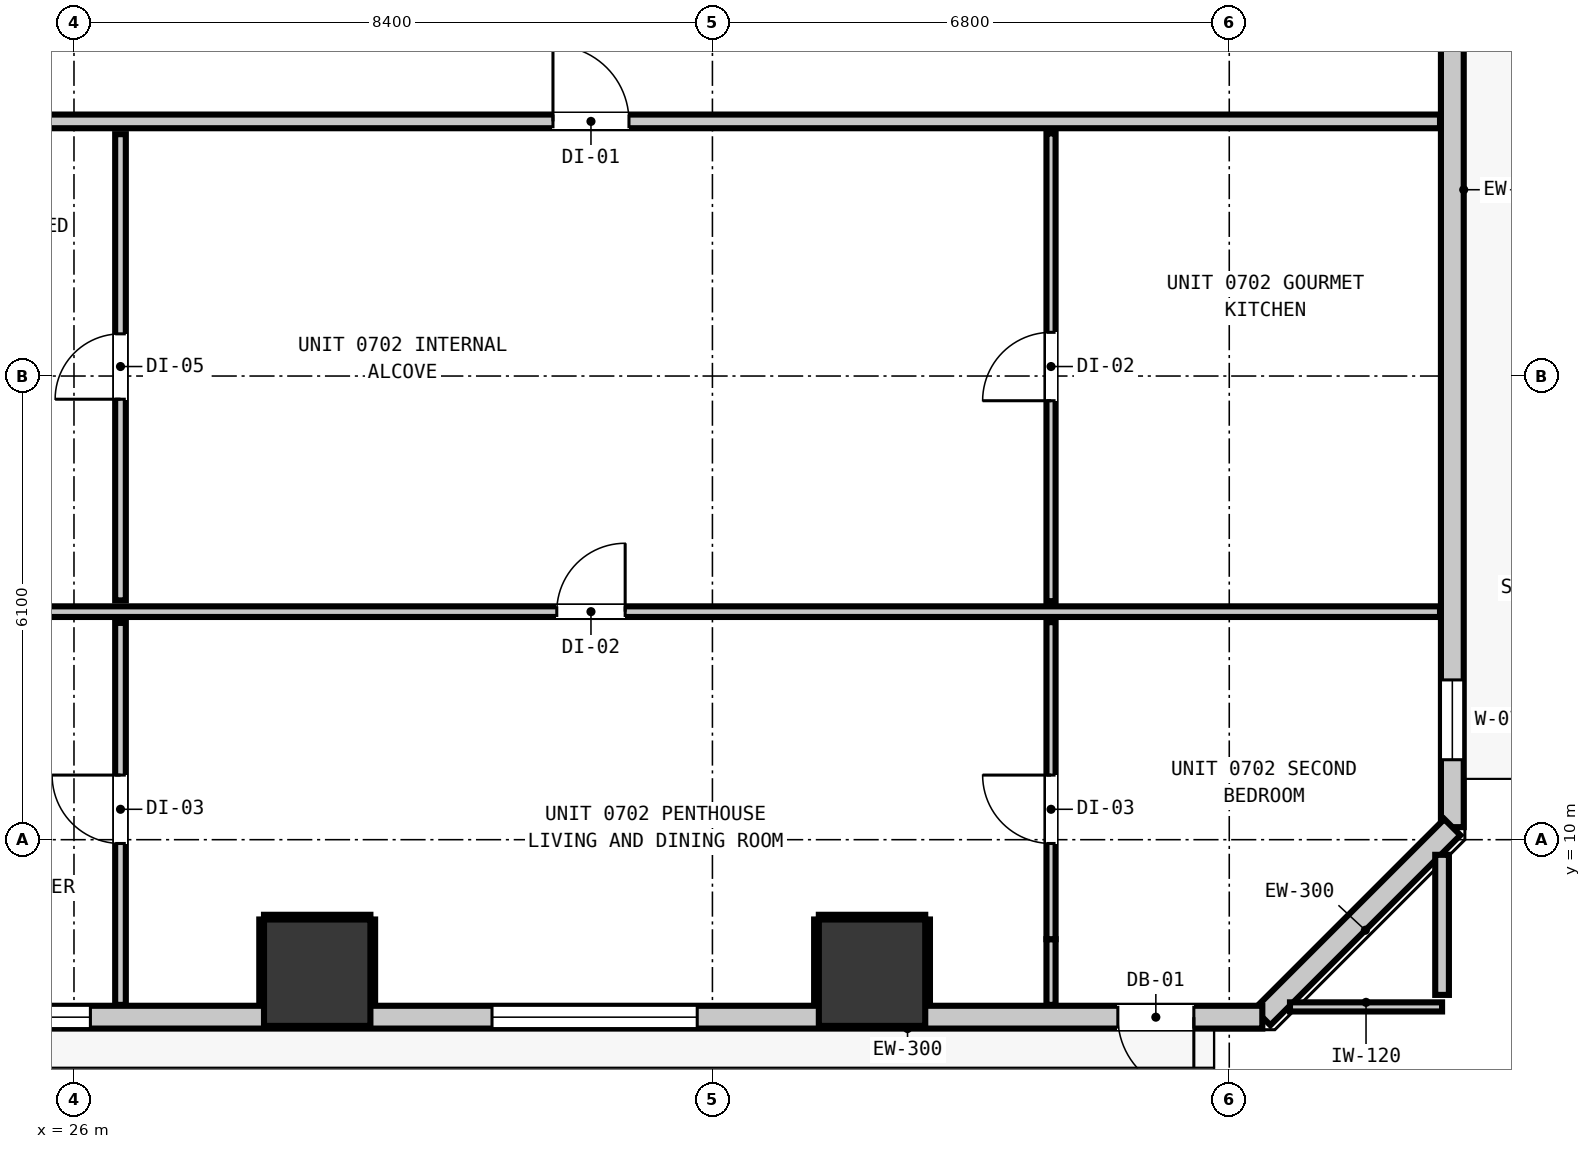
"""IFC4 building model, lengths in metres.
Left out: names, types, materials, properties, quantities, classifications, styles, units other than length and angle.
Written with IfcOpenShell. Run it as: python <this file> out.ifc"""

import sys

from ifc_helpers import new_model, si_unit, direction, frame, frame_2d, origin, origin_2d, place, context, subcontext, project, spatial, rectangle, extrude, element, fill, save


model = new_model("IFC4")
c1 = context("Model", 3, precision=1e-05, world=origin(), true_north=direction((0.0, 1.0)))
c2 = subcontext(c1, "Body", "Model", "MODEL_VIEW")
j1 = project(units=[si_unit("LENGTHUNIT", "METRE"), si_unit("PLANEANGLEUNIT", "RADIAN")], contexts=[c1])
p1 = place(None, origin())
s1 = spatial("IfcSite", under=j1, at=p1, CompositionType="ELEMENT")
p2 = place(p1, origin())
s2 = spatial("IfcBuilding", under=s1, at=p2, CompositionType="ELEMENT")
p3 = place(p2, frame((0.0, 0.0, 28.64)))
s3 = spatial("IfcBuildingStorey", under=s2, at=p3, CompositionType="ELEMENT", Elevation=28.64)
for number, where, z_axis, x_axis in (
    (1, (29.2, 8.25, 0.0), (0.0, 0.0, 1.0), (1.0, 0.0, 0.0)),
    (2, (36.5, 8.25, 0.0), (0.0, 0.0, 1.0), (1.0, 0.0, 0.0)),
):
    element("IfcColumn", number, at=place(p3, frame(where, z_axis=z_axis, x_axis=x_axis)), inside=s3, PredefinedType="COLUMN", context=c2, shape_type="SweptSolid", body=[
        extrude(rectangle(XDim=1.4, YDim=1.4, at=origin_2d()), origin(), (0.0, 0.0, 1.0), 3.32),
    ])
p4 = place(p3, frame((44.135, 44.835, 0.0), z_axis=(0.0, 0.0, 1.0), x_axis=(0.0, -1.0, 0.0)))
e3 = element("IfcWall", 3, at=p4, inside=s3, PredefinedType="STANDARD", context=c2, shape_type="SweptSolid", body=[
    extrude(rectangle(XDim=34.67, YDim=0.3, at=frame_2d((17.335, 0.0))), origin(), (0.0, 0.0, 1.0), 3.06),
])
p5 = place(p4, frame((1.251, 0.0, 0.0)))
e4 = element("IfcOpeningElement", 4, at=p5, cuts=e3, PredefinedType="OPENING", context=c2, shape_type="SweptSolid", body=[
    extrude(rectangle(XDim=1.0, YDim=2.15, at=frame_2d((0.5, 1.075))), frame((0.0, 0.16, 0.0), z_axis=(0.0, -1.0, 0.0), x_axis=(1.0, 0.0, 0.0)), (0.0, 0.0, 1.0), 0.32),
])
p6 = place(p4, frame((32.733, 0.0, 0.85)))
e5 = element("IfcOpeningElement", 5, at=p6, cuts=e3, PredefinedType="OPENING", context=c2, shape_type="SweptSolid", body=[
    extrude(rectangle(XDim=1.05, YDim=1.65, at=frame_2d((0.525, 0.825))), frame((0.0, 0.16, 0.0), z_axis=(0.0, -1.0, 0.0), x_axis=(1.0, 0.0, 0.0)), (0.0, 0.0, 1.0), 0.32),
])
p7 = place(p4, frame((17.135, 0.0, 0.85)))
e6 = element("IfcOpeningElement", 6, at=p7, cuts=e3, PredefinedType="OPENING", context=c2, shape_type="SweptSolid", body=[
    extrude(rectangle(XDim=2.7, YDim=2.0, at=frame_2d((1.35, 1.0))), frame((0.0, 0.16, 0.0), z_axis=(0.0, -1.0, 0.0), x_axis=(1.0, 0.0, 0.0)), (0.0, 0.0, 1.0), 0.32),
])
p8 = place(p4, frame((6.984, 0.0, 0.85)))
e7 = element("IfcOpeningElement", 7, at=p8, cuts=e3, PredefinedType="OPENING", context=c2, shape_type="SweptSolid", body=[
    extrude(rectangle(XDim=1.05, YDim=1.65, at=frame_2d((0.525, 0.825))), frame((0.0, 0.16, 0.0), z_axis=(0.0, -1.0, 0.0), x_axis=(1.0, 0.0, 0.0)), (0.0, 0.0, 1.0), 0.32),
])
p9 = place(p3, frame((44.135, 10.165, 0.0), z_axis=(0.0, 0.0, 1.0), x_axis=(-0.707106781187, -0.707106781187, 0.0)))
e8 = element("IfcWall", 8, at=p9, inside=s3, PredefinedType="STANDARD", context=c2, shape_type="SweptSolid", body=[
    extrude(rectangle(XDim=3.536, YDim=0.3, at=frame_2d((1.768, 0.0))), origin(), (0.0, 0.0, 1.0), 3.06),
])
p10 = place(p3, frame((41.635, 7.665, 0.0), z_axis=(0.0, 0.0, 1.0), x_axis=(-1.0, 0.0, 0.0)))
e9 = element("IfcWall", 9, at=p10, inside=s3, PredefinedType="STANDARD", context=c2, shape_type="SweptSolid", body=[
    extrude(rectangle(XDim=37.47, YDim=0.3, at=frame_2d((18.735, 0.0))), origin(), (0.0, 0.0, 1.0), 3.06),
])
p11 = place(p10, frame((0.901, 0.0, 0.0)))
e10 = element("IfcOpeningElement", 10, at=p11, cuts=e9, PredefinedType="OPENING", context=c2, shape_type="SweptSolid", body=[
    extrude(rectangle(XDim=1.0, YDim=2.15, at=frame_2d((0.5, 1.075))), frame((0.0, 0.16, 0.0), z_axis=(0.0, -1.0, 0.0), x_axis=(1.0, 0.0, 0.0)), (0.0, 0.0, 1.0), 0.32),
])
p12 = place(p10, frame((31.795, 0.0, 0.85)))
e11 = element("IfcOpeningElement", 11, at=p12, cuts=e9, PredefinedType="OPENING", context=c2, shape_type="SweptSolid", body=[
    extrude(rectangle(XDim=2.7, YDim=2.0, at=frame_2d((1.35, 1.0))), frame((0.0, 0.16, 0.0), z_axis=(0.0, -1.0, 0.0), x_axis=(1.0, 0.0, 0.0)), (0.0, 0.0, 1.0), 0.32),
])
p13 = place(p10, frame((36.621, 0.0, 0.85)))
e12 = element("IfcOpeningElement", 12, at=p13, cuts=e9, PredefinedType="OPENING", context=c2, shape_type="SweptSolid", body=[
    extrude(rectangle(XDim=0.58, YDim=1.5, at=frame_2d((0.29, 0.75))), frame((0.0, 0.16, 0.0), z_axis=(0.0, -1.0, 0.0), x_axis=(1.0, 0.0, 0.0)), (0.0, 0.0, 1.0), 0.32),
])
p14 = place(p10, frame((24.495, 0.0, 0.85)))
e13 = element("IfcOpeningElement", 13, at=p14, cuts=e9, PredefinedType="OPENING", context=c2, shape_type="SweptSolid", body=[
    extrude(rectangle(XDim=2.7, YDim=2.0, at=frame_2d((1.35, 1.0))), frame((0.0, 0.16, 0.0), z_axis=(0.0, -1.0, 0.0), x_axis=(1.0, 0.0, 0.0)), (0.0, 0.0, 1.0), 0.32),
])
p15 = place(p10, frame((22.221, 0.0, 0.85)))
e14 = element("IfcOpeningElement", 14, at=p15, cuts=e9, PredefinedType="OPENING", context=c2, shape_type="SweptSolid", body=[
    extrude(rectangle(XDim=1.05, YDim=1.65, at=frame_2d((0.525, 0.825))), frame((0.0, 0.16, 0.0), z_axis=(0.0, -1.0, 0.0), x_axis=(1.0, 0.0, 0.0)), (0.0, 0.0, 1.0), 0.32),
])
p16 = place(p10, frame((7.435, 0.0, 0.85)))
e15 = element("IfcOpeningElement", 15, at=p16, cuts=e9, PredefinedType="OPENING", context=c2, shape_type="SweptSolid", body=[
    extrude(rectangle(XDim=2.7, YDim=2.0, at=frame_2d((1.35, 1.0))), frame((0.0, 0.16, 0.0), z_axis=(0.0, -1.0, 0.0), x_axis=(1.0, 0.0, 0.0)), (0.0, 0.0, 1.0), 0.32),
])
p17 = place(p10, frame((15.419, 0.0, 0.85)))
e16 = element("IfcOpeningElement", 16, at=p17, cuts=e9, PredefinedType="OPENING", context=c2, shape_type="SweptSolid", body=[
    extrude(rectangle(XDim=2.7, YDim=2.0, at=frame_2d((1.35, 1.0))), frame((0.0, 0.16, 0.0), z_axis=(0.0, -1.0, 0.0), x_axis=(1.0, 0.0, 0.0)), (0.0, 0.0, 1.0), 0.32),
])
p18 = place(p3, frame((1.827, 19.45, 0.0), z_axis=(0.0, 0.0, 1.0), x_axis=(1.0, 0.0, 0.0)))
e17 = element("IfcWall", 17, at=p18, inside=s3, PredefinedType="PARTITIONING", context=c2, shape_type="SweptSolid", body=[
    extrude(rectangle(XDim=42.146, YDim=0.18, at=frame_2d((21.073, 0.0))), origin(), (0.0, 0.0, 1.0), 3.06),
])
p19 = place(p18, frame((8.602, 0.0, 0.0)))
e18 = element("IfcOpeningElement", 18, at=p19, cuts=e17, PredefinedType="OPENING", context=c2, shape_type="SweptSolid", body=[
    extrude(rectangle(XDim=1.0, YDim=2.15, at=frame_2d((0.5, 1.075))), frame((0.0, 0.1, 0.0), z_axis=(0.0, -1.0, 0.0), x_axis=(1.0, 0.0, 0.0)), (0.0, 0.0, 1.0), 0.2),
])
p20 = place(p18, frame((30.475, 0.0, 0.0)))
e19 = element("IfcOpeningElement", 19, at=p20, cuts=e17, PredefinedType="OPENING", context=c2, shape_type="SweptSolid", body=[
    extrude(rectangle(XDim=1.0, YDim=2.15, at=frame_2d((0.5, 1.075))), frame((0.0, 0.1, 0.0), z_axis=(0.0, -1.0, 0.0), x_axis=(1.0, 0.0, 0.0)), (0.0, 0.0, 1.0), 0.2),
])
p21 = place(p3, frame((11.688, 13.0, 0.0), z_axis=(0.0, 0.0, 1.0), x_axis=(1.0, 0.0, 0.0)))
e20 = element("IfcWall", 20, at=p21, inside=s3, PredefinedType="PARTITIONING", context=c2, shape_type="SweptSolid", body=[
    extrude(rectangle(XDim=32.285, YDim=0.14, at=frame_2d((16.143, 0.0))), origin(), (0.0, 0.0, 1.0), 3.06),
])
p22 = place(p21, frame((20.664, 0.0, 0.0)))
e21 = element("IfcOpeningElement", 21, at=p22, cuts=e20, PredefinedType="OPENING", context=c2, shape_type="SweptSolid", body=[
    extrude(rectangle(XDim=0.9, YDim=2.1, at=frame_2d((0.45, 1.05))), frame((0.0, 0.08, 0.0), z_axis=(0.0, -1.0, 0.0), x_axis=(1.0, 0.0, 0.0)), (0.0, 0.0, 1.0), 0.16),
])
p23 = place(p3, frame((41.999, 7.8, 0.0), z_axis=(0.0, 0.0, 1.0), x_axis=(1.0, 0.0, 0.0)))
e22 = element("IfcWall", 22, at=p23, inside=s3, PredefinedType="PARTITIONING", context=c2, shape_type="SweptSolid", body=[
    extrude(rectangle(XDim=2.001, YDim=0.12, at=frame_2d((1.0, 0.0))), origin(), (0.0, 0.0, 1.0), 3.06),
])
p24 = place(p3, frame((44.0, 7.958, 0.0), z_axis=(0.0, 0.0, 1.0), x_axis=(0.0, 1.0, 0.0)))
e23 = element("IfcWall", 23, at=p24, inside=s3, PredefinedType="PARTITIONING", context=c2, shape_type="SweptSolid", body=[
    extrude(rectangle(XDim=1.843, YDim=0.18, at=frame_2d((0.921, 0.0))), origin(), (0.0, 0.0, 1.0), 3.06),
])
p25 = place(p3, frame((26.612, 7.827, 0.0), z_axis=(0.0, 0.0, 1.0), x_axis=(0.0, 1.0, 0.0)))
e24 = element("IfcWall", 24, at=p25, inside=s3, PredefinedType="PARTITIONING", context=c2, shape_type="SweptSolid", body=[
    extrude(rectangle(XDim=5.025, YDim=0.14, at=frame_2d((2.513, 0.0))), origin(), (0.0, 0.0, 1.0), 3.06),
])
p26 = place(p25, frame((2.123, 0.0, 0.0)))
e25 = element("IfcOpeningElement", 25, at=p26, cuts=e24, PredefinedType="OPENING", context=c2, shape_type="SweptSolid", body=[
    extrude(rectangle(XDim=0.9, YDim=2.1, at=frame_2d((0.45, 1.05))), frame((0.0, 0.08, 0.0), z_axis=(0.0, -1.0, 0.0), x_axis=(1.0, 0.0, 0.0)), (0.0, 0.0, 1.0), 0.16),
])
p27 = place(p3, frame((26.612, 13.148, 0.0), z_axis=(0.0, 0.0, 1.0), x_axis=(0.0, 1.0, 0.0)))
e26 = element("IfcWall", 26, at=p27, inside=s3, PredefinedType="PARTITIONING", context=c2, shape_type="SweptSolid", body=[
    extrude(rectangle(XDim=6.134, YDim=0.14, at=frame_2d((3.067, 0.0))), origin(), (0.0, 0.0, 1.0), 3.06),
])
p28 = place(p27, frame((2.647, 0.0, 0.0)))
e27 = element("IfcOpeningElement", 27, at=p28, cuts=e26, PredefinedType="OPENING", context=c2, shape_type="SweptSolid", body=[
    extrude(rectangle(XDim=0.86, YDim=2.02, at=frame_2d((0.43, 1.01))), frame((0.0, 0.08, 0.0), z_axis=(0.0, -1.0, 0.0), x_axis=(1.0, 0.0, 0.0)), (0.0, 0.0, 1.0), 0.16),
])
p29 = place(p3, frame((38.855, 7.827, 0.0), z_axis=(0.0, 0.0, 1.0), x_axis=(0.0, 1.0, 0.0)))
e28 = element("IfcWall", 28, at=p29, inside=s3, PredefinedType="PARTITIONING", context=c2, shape_type="SweptSolid", body=[
    extrude(rectangle(XDim=0.864, YDim=0.12, at=frame_2d((0.432, 0.0))), origin(), (0.0, 0.0, 1.0), 3.06),
])
p30 = place(p3, frame((38.855, 8.691, 0.0), z_axis=(0.0, 0.0, 1.0), x_axis=(0.0, 1.0, 0.0)))
e29 = element("IfcWall", 29, at=p30, inside=s3, PredefinedType="PARTITIONING", context=c2, shape_type="SweptSolid", body=[
    extrude(rectangle(XDim=4.171, YDim=0.12, at=frame_2d((2.085, 0.0))), origin(), (0.0, 0.0, 1.0), 2.445),
])
p31 = place(p30, frame((1.259, 0.0, 0.0)))
e30 = element("IfcOpeningElement", 30, at=p31, cuts=e29, PredefinedType="OPENING", context=c2, shape_type="SweptSolid", body=[
    extrude(rectangle(XDim=0.9, YDim=2.1, at=frame_2d((0.45, 1.05))), frame((0.0, 0.07, 0.0), z_axis=(0.0, -1.0, 0.0), x_axis=(1.0, 0.0, 0.0)), (0.0, 0.0, 1.0), 0.14),
])
p32 = place(p3, frame((38.855, 13.138, 0.0), z_axis=(0.0, 0.0, 1.0), x_axis=(0.0, 1.0, 0.0)))
e31 = element("IfcWall", 31, at=p32, inside=s3, PredefinedType="PARTITIONING", context=c2, shape_type="SweptSolid", body=[
    extrude(rectangle(XDim=6.154, YDim=0.12, at=frame_2d((3.077, 0.0))), origin(), (0.0, 0.0, 1.0), 2.445),
])
p33 = place(p32, frame((2.637, 0.0, 0.0)))
e32 = element("IfcOpeningElement", 32, at=p33, cuts=e31, PredefinedType="OPENING", context=c2, shape_type="SweptSolid", body=[
    extrude(rectangle(XDim=0.9, YDim=2.1, at=frame_2d((0.45, 1.05))), frame((0.0, 0.07, 0.0), z_axis=(0.0, -1.0, 0.0), x_axis=(1.0, 0.0, 0.0)), (0.0, 0.0, 1.0), 0.14),
])
p34 = place(p3, frame((28.5, 8.982, 0.0), z_axis=(0.0, 0.0, 1.0), x_axis=(1.0, 0.0, 0.0)))
e33 = element("IfcWall", 33, at=p34, inside=s3, PredefinedType="PARTITIONING", context=c2, shape_type="SweptSolid", body=[
    extrude(rectangle(XDim=1.4, YDim=0.06, at=frame_2d((0.7, 0.0))), origin(), (0.0, 0.0, 1.0), 1.45),
])
for number, where, z_axis, x_axis in (
    (34, (28.468, 7.83, 0.0), (0.0, 0.0, 1.0), (0.0, 1.0, 0.0)),
    (35, (29.932, 7.83, 0.0), (0.0, 0.0, 1.0), (0.0, 1.0, 0.0)),
):
    element("IfcWall", number, at=place(p3, frame(where, z_axis=z_axis, x_axis=x_axis)), inside=s3, PredefinedType="PARTITIONING", context=c2, shape_type="SweptSolid", body=[
        extrude(rectangle(XDim=1.12, YDim=0.06, at=frame_2d((0.56, 0.0))), origin(), (0.0, 0.0, 1.0), 1.45),
    ])
p35 = place(p3, frame((35.8, 8.982, 0.0), z_axis=(0.0, 0.0, 1.0), x_axis=(1.0, 0.0, 0.0)))
e36 = element("IfcWall", 36, at=p35, inside=s3, PredefinedType="PARTITIONING", context=c2, shape_type="SweptSolid", body=[
    extrude(rectangle(XDim=1.4, YDim=0.06, at=frame_2d((0.7, 0.0))), origin(), (0.0, 0.0, 1.0), 1.45),
])
for number, where, z_axis, x_axis in (
    (37, (35.768, 7.83, 0.0), (0.0, 0.0, 1.0), (0.0, 1.0, 0.0)),
    (38, (37.232, 7.83, 0.0), (0.0, 0.0, 1.0), (0.0, 1.0, 0.0)),
):
    element("IfcWall", number, at=place(p3, frame(where, z_axis=z_axis, x_axis=x_axis)), inside=s3, PredefinedType="PARTITIONING", context=c2, shape_type="SweptSolid", body=[
        extrude(rectangle(XDim=1.12, YDim=0.06, at=frame_2d((0.56, 0.0))), origin(), (0.0, 0.0, 1.0), 1.45),
    ])
p36 = place(p11, origin())
e39 = element("IfcDoor", 39, at=p36, inside=s3, OperationType="SINGLE_SWING_LEFT", PredefinedType="DOOR", context=c2, shape_type="SweptSolid", body=[
    extrude(rectangle(XDim=1.0, YDim=2.15, at=frame_2d((0.5, 1.075))), frame((0.0, 0.025, 0.0), z_axis=(0.0, -1.0, 0.0), x_axis=(1.0, 0.0, 0.0)), (0.0, 0.0, 1.0), 0.05),
])
fill(e10, e39)
p37 = place(p6, origin())
e40 = element("IfcWindow", 40, at=p37, inside=s3, PartitioningType="SINGLE_PANEL", PredefinedType="WINDOW", context=c2, shape_type="SweptSolid", body=[
    extrude(rectangle(XDim=1.05, YDim=1.65, at=frame_2d((0.525, 0.825))), frame((0.0, 0.03, 0.0), z_axis=(0.0, -1.0, 0.0), x_axis=(1.0, 0.0, 0.0)), (0.0, 0.0, 1.0), 0.06),
])
fill(e5, e40)
p38 = place(p16, origin())
e41 = element("IfcWindow", 41, at=p38, inside=s3, PartitioningType="SINGLE_PANEL", PredefinedType="WINDOW", context=c2, shape_type="SweptSolid", body=[
    extrude(rectangle(XDim=2.7, YDim=2.0, at=frame_2d((1.35, 1.0))), frame((0.0, 0.03, 0.0), z_axis=(0.0, -1.0, 0.0), x_axis=(1.0, 0.0, 0.0)), (0.0, 0.0, 1.0), 0.06),
])
fill(e15, e41)
p39 = place(p17, origin())
e42 = element("IfcWindow", 42, at=p39, inside=s3, PartitioningType="SINGLE_PANEL", PredefinedType="WINDOW", context=c2, shape_type="SweptSolid", body=[
    extrude(rectangle(XDim=2.7, YDim=2.0, at=frame_2d((1.35, 1.0))), frame((0.0, 0.03, 0.0), z_axis=(0.0, -1.0, 0.0), x_axis=(1.0, 0.0, 0.0)), (0.0, 0.0, 1.0), 0.06),
])
fill(e16, e42)
p40 = place(p20, origin())
e43 = element("IfcDoor", 43, at=p40, inside=s3, OperationType="SINGLE_SWING_LEFT", PredefinedType="DOOR", context=c2, shape_type="SweptSolid", body=[
    extrude(rectangle(XDim=1.0, YDim=2.15, at=frame_2d((0.5, 1.075))), frame((0.0, 0.025, 0.0), z_axis=(0.0, -1.0, 0.0), x_axis=(1.0, 0.0, 0.0)), (0.0, 0.0, 1.0), 0.05),
])
fill(e19, e43)
p41 = place(p22, origin())
e44 = element("IfcDoor", 44, at=p41, inside=s3, OperationType="SINGLE_SWING_RIGHT", PredefinedType="DOOR", context=c2, shape_type="SweptSolid", body=[
    extrude(rectangle(XDim=0.9, YDim=2.1, at=frame_2d((0.45, 1.05))), frame((0.0, 0.025, 0.0), z_axis=(0.0, -1.0, 0.0), x_axis=(1.0, 0.0, 0.0)), (0.0, 0.0, 1.0), 0.05),
])
fill(e21, e44)
p42 = place(p28, origin())
e45 = element("IfcDoor", 45, at=p42, inside=s3, OperationType="SINGLE_SWING_LEFT", PredefinedType="DOOR", context=c2, shape_type="SweptSolid", body=[
    extrude(rectangle(XDim=0.86, YDim=2.02, at=frame_2d((0.43, 1.01))), frame((0.0, 0.025, 0.0), z_axis=(0.0, -1.0, 0.0), x_axis=(1.0, 0.0, 0.0)), (0.0, 0.0, 1.0), 0.05),
])
fill(e27, e45)
p43 = place(p26, origin())
e46 = element("IfcDoor", 46, at=p43, inside=s3, OperationType="SINGLE_SWING_RIGHT", PredefinedType="DOOR", context=c2, shape_type="SweptSolid", body=[
    extrude(rectangle(XDim=0.9, YDim=2.1, at=frame_2d((0.45, 1.05))), frame((0.0, 0.025, 0.0), z_axis=(0.0, -1.0, 0.0), x_axis=(1.0, 0.0, 0.0)), (0.0, 0.0, 1.0), 0.05),
])
fill(e25, e46)
p44 = place(p33, origin())
e47 = element("IfcDoor", 47, at=p44, inside=s3, OperationType="SINGLE_SWING_LEFT", PredefinedType="DOOR", context=c2, shape_type="SweptSolid", body=[
    extrude(rectangle(XDim=0.9, YDim=2.1, at=frame_2d((0.45, 1.05))), frame((0.0, 0.025, 0.0), z_axis=(0.0, -1.0, 0.0), x_axis=(1.0, 0.0, 0.0)), (0.0, 0.0, 1.0), 0.05),
])
fill(e32, e47)
p45 = place(p31, origin())
e48 = element("IfcDoor", 48, at=p45, inside=s3, OperationType="SINGLE_SWING_RIGHT", PredefinedType="DOOR", context=c2, shape_type="SweptSolid", body=[
    extrude(rectangle(XDim=0.9, YDim=2.1, at=frame_2d((0.45, 1.05))), frame((0.0, 0.025, 0.0), z_axis=(0.0, -1.0, 0.0), x_axis=(1.0, 0.0, 0.0)), (0.0, 0.0, 1.0), 0.05),
])
fill(e30, e48)
save(model, sys.argv[1])
